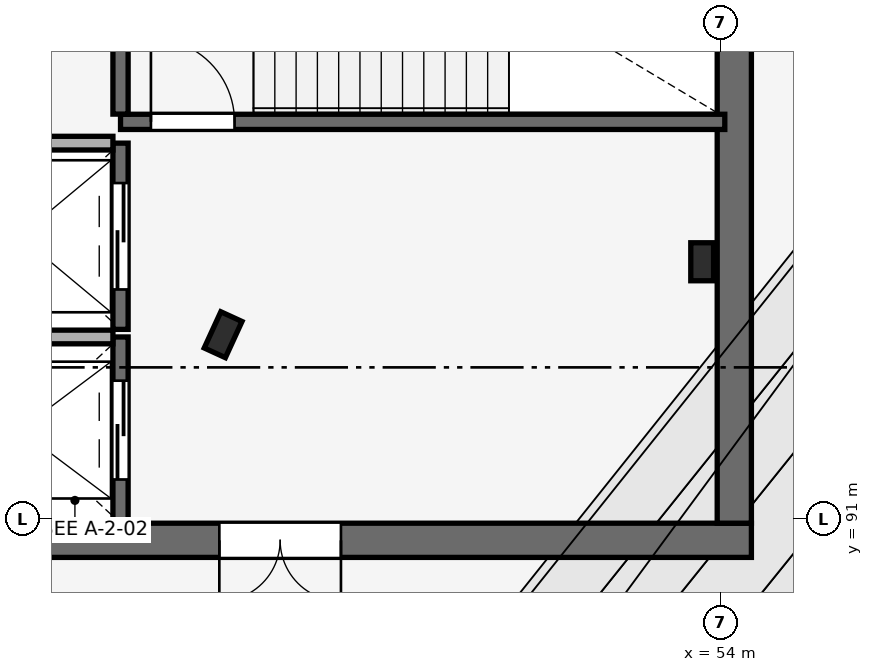
"""IFC4 building model, lengths in metres.
Left out: names, types, materials, properties, quantities, classifications, styles, units other than length and angle.
Written with IfcOpenShell. Run it as: python <this file> out.ifc"""

import sys

from ifc_helpers import new_model, si_unit, direction, frame, frame_2d, origin, origin_2d, place, context, subcontext, project, spatial, rectangle, i_section, extrude, element, fill, save


model = new_model("IFC4")
c1 = context("Model", 3, precision=1e-05, world=origin(), true_north=direction((0.0, 1.0)))
c2 = subcontext(c1, "Body", "Model", "MODEL_VIEW")
j1 = project(units=[si_unit("LENGTHUNIT", "METRE"), si_unit("PLANEANGLEUNIT", "RADIAN")], contexts=[c1])
p1 = place(None, origin())
s1 = spatial("IfcSite", under=j1, at=p1, CompositionType="ELEMENT")
p2 = place(p1, origin())
s2 = spatial("IfcBuilding", under=s1, at=p2, CompositionType="ELEMENT")
p3 = place(p2, frame((0.0, 0.0, 15.0)))
s3 = spatial("IfcBuildingStorey", under=s2, at=p3, CompositionType="ELEMENT", Elevation=15.0)
p4 = place(p3, frame((47.45, 93.43, 0.0), z_axis=(0.0, 0.0, 1.0), x_axis=(-0.909018020308, 0.416756810089, 0.0)))
e1 = element("IfcColumn", 1, at=p4, inside=s3, PredefinedType="COLUMN", context=c2, shape_type="SweptSolid", body=[
    extrude(i_section(OverallWidth=0.306, OverallDepth=0.524, WebThickness=0.021, FlangeThickness=0.04, FilletRadius=0.027, at=origin_2d()), origin(), (0.0, 0.0, 1.0), 4.5),
])
p5 = place(p3, frame((43.0, 90.725, 0.0), z_axis=(0.0, 0.0, 1.0), x_axis=(1.0, 0.0, 0.0)))
e2 = element("IfcWall", 2, at=p5, inside=s3, PredefinedType="SHEAR", context=c2, shape_type="SweptSolid", body=[
    extrude(rectangle(XDim=11.4, YDim=0.45, at=frame_2d((5.7, 0.0))), origin(), (0.0, 0.0, 1.0), 4.5),
])
p6 = place(p5, frame((4.4, 0.0, 0.0)))
e3 = element("IfcOpeningElement", 3, at=p6, cuts=e2, PredefinedType="OPENING", context=c2, shape_type="SweptSolid", body=[
    extrude(rectangle(XDim=1.6, YDim=2.2, at=frame_2d((0.8, 1.1))), frame((0.0, 0.235, 0.0), z_axis=(0.0, -1.0, 0.0), x_axis=(1.0, 0.0, 0.0)), (0.0, 0.0, 1.0), 0.47),
])
p7 = place(p3, frame((54.175, 90.95, 0.0), z_axis=(0.0, 0.0, 1.0), x_axis=(0.0, 1.0, 0.0)))
e4 = element("IfcWall", 4, at=p7, inside=s3, PredefinedType="SHEAR", context=c2, shape_type="SweptSolid", body=[
    extrude(rectangle(XDim=9.1, YDim=0.45, at=frame_2d((4.55, 0.0))), origin(), (0.0, 0.0, 1.0), 4.5),
])
p8 = place(p3, frame((53.752, 94.389, 0.0), z_axis=(0.0, 0.0, 1.0), x_axis=(1.0, 0.0, 0.0)))
e5 = element("IfcColumn", 5, at=p8, inside=s3, PredefinedType="COLUMN", context=c2, shape_type="SweptSolid", body=[
    extrude(i_section(OverallWidth=0.3, OverallDepth=0.5, WebThickness=0.014, FlangeThickness=0.028, FilletRadius=0.027, at=origin_2d()), origin(), (0.0, 0.0, 1.0), 4.5),
])
p9 = place(p3, frame((46.1, 90.95, 0.0), z_axis=(0.0, 0.0, 1.0), x_axis=(0.0, 1.0, 0.0)))
e6 = element("IfcWall", 6, at=p9, inside=s3, PredefinedType="SHEAR", context=c2, shape_type="SweptSolid", body=[
    extrude(rectangle(XDim=2.45, YDim=0.2, at=frame_2d((1.225, 0.0))), origin(), (0.0, 0.0, 1.0), 4.25),
])
p10 = place(p9, frame((0.575, 0.0, 0.0)))
e7 = element("IfcOpeningElement", 7, at=p10, cuts=e6, PredefinedType="OPENING", context=c2, shape_type="SweptSolid", body=[
    extrude(rectangle(XDim=1.3, YDim=2.2, at=frame_2d((0.65, 1.1))), frame((0.0, 0.11, 0.0), z_axis=(0.0, -1.0, 0.0), x_axis=(1.0, 0.0, 0.0)), (0.0, 0.0, 1.0), 0.22),
])
p11 = place(p3, frame((43.55, 93.4, 0.0), z_axis=(0.0, 0.0, 1.0), x_axis=(1.0, 0.0, 0.0)))
e8 = element("IfcWall", 8, at=p11, inside=s3, PredefinedType="PARTITIONING", context=c2, shape_type="SweptSolid", body=[
    extrude(rectangle(XDim=2.45, YDim=0.18, at=frame_2d((1.225, 0.0))), origin(), (0.0, 0.0, 1.0), 4.5),
])
p12 = place(p3, frame((46.1, 93.5, 0.0), z_axis=(0.0, 0.0, 1.0), x_axis=(0.0, 1.0, 0.0)))
e9 = element("IfcWall", 9, at=p12, inside=s3, PredefinedType="SHEAR", context=c2, shape_type="SweptSolid", body=[
    extrude(rectangle(XDim=2.45, YDim=0.2, at=frame_2d((1.225, 0.0))), origin(), (0.0, 0.0, 1.0), 4.25),
])
p13 = place(p12, frame((0.525, 0.0, 0.0)))
e10 = element("IfcOpeningElement", 10, at=p13, cuts=e9, PredefinedType="OPENING", context=c2, shape_type="SweptSolid", body=[
    extrude(rectangle(XDim=1.4, YDim=2.2, at=frame_2d((0.7, 1.1))), frame((0.0, 0.11, 0.0), z_axis=(0.0, -1.0, 0.0), x_axis=(1.0, 0.0, 0.0)), (0.0, 0.0, 1.0), 0.22),
])
p14 = place(p3, frame((43.55, 95.95, 0.0), z_axis=(0.0, 0.0, 1.0), x_axis=(1.0, 0.0, 0.0)))
e11 = element("IfcWall", 11, at=p14, inside=s3, PredefinedType="PARTITIONING", context=c2, shape_type="SweptSolid", body=[
    extrude(rectangle(XDim=2.45, YDim=0.18, at=frame_2d((1.225, 0.0))), origin(), (0.0, 0.0, 1.0), 4.5),
])
p15 = place(p3, frame((46.1, 96.23, 0.0), z_axis=(0.0, 0.0, 1.0), x_axis=(1.0, 0.0, 0.0)))
e12 = element("IfcWall", 12, at=p15, inside=s3, PredefinedType="SHEAR", context=c2, shape_type="SweptSolid", body=[
    extrude(rectangle(XDim=7.95, YDim=0.2, at=frame_2d((3.975, 0.0))), origin(), (0.0, 0.0, 1.0), 4.5),
])
p16 = place(p15, frame((0.4, 0.0, 0.0)))
e13 = element("IfcOpeningElement", 13, at=p16, cuts=e12, PredefinedType="OPENING", context=c2, shape_type="SweptSolid", body=[
    extrude(rectangle(XDim=1.1, YDim=2.15, at=frame_2d((0.55, 1.075))), frame((0.0, 0.11, 0.0), z_axis=(0.0, -1.0, 0.0), x_axis=(1.0, 0.0, 0.0)), (0.0, 0.0, 1.0), 0.22),
])
p17 = place(p3, frame((46.1, 96.332, 0.0), z_axis=(0.0, 0.0, 1.0), x_axis=(0.0, 1.0, 0.0)))
e14 = element("IfcWall", 14, at=p17, inside=s3, PredefinedType="SHEAR", context=c2, shape_type="SweptSolid", body=[
    extrude(rectangle(XDim=3.686, YDim=0.2, at=frame_2d((1.843, 0.0))), origin(), (0.0, 0.0, 1.0), 4.5),
])
p18 = place(p10, origin())
e15 = element("IfcDoor", 15, at=p18, inside=s3, OperationType="DOUBLE_DOOR_SLIDING", PredefinedType="DOOR", context=c2, shape_type="SweptSolid", body=[
    extrude(rectangle(XDim=1.3, YDim=2.2, at=frame_2d((0.65, 1.1))), frame((0.0, 0.025, 0.0), z_axis=(0.0, -1.0, 0.0), x_axis=(1.0, 0.0, 0.0)), (0.0, 0.0, 1.0), 0.05),
])
fill(e7, e15)
p19 = place(p13, origin())
e16 = element("IfcDoor", 16, at=p19, inside=s3, OperationType="DOUBLE_DOOR_SLIDING", PredefinedType="DOOR", context=c2, shape_type="SweptSolid", body=[
    extrude(rectangle(XDim=1.4, YDim=2.2, at=frame_2d((0.7, 1.1))), frame((0.0, 0.025, 0.0), z_axis=(0.0, -1.0, 0.0), x_axis=(1.0, 0.0, 0.0)), (0.0, 0.0, 1.0), 0.05),
])
fill(e10, e16)
p20 = place(p16, frame((1.1, 0.0, 0.0), z_axis=(0.0, 0.0, 1.0), x_axis=(-1.0, 0.0, 0.0)))
e17 = element("IfcDoor", 17, at=p20, inside=s3, OperationType="SINGLE_SWING_RIGHT", PredefinedType="DOOR", context=c2, shape_type="SweptSolid", body=[
    extrude(rectangle(XDim=1.1, YDim=2.15, at=frame_2d((0.55, 1.075))), frame((0.0, 0.025, 0.0), z_axis=(0.0, -1.0, 0.0), x_axis=(1.0, 0.0, 0.0)), (0.0, 0.0, 1.0), 0.05),
])
fill(e13, e17)
p21 = place(p6, frame((1.6, 0.0, 0.0), z_axis=(0.0, 0.0, 1.0), x_axis=(-1.0, 0.0, 0.0)))
e18 = element("IfcDoor", 18, at=p21, inside=s3, OperationType="DOUBLE_DOOR_SINGLE_SWING", PredefinedType="DOOR", context=c2, shape_type="SweptSolid", body=[
    extrude(rectangle(XDim=1.6, YDim=2.2, at=frame_2d((0.8, 1.1))), frame((0.0, 0.025, 0.0), z_axis=(0.0, -1.0, 0.0), x_axis=(1.0, 0.0, 0.0)), (0.0, 0.0, 1.0), 0.05),
])
fill(e3, e18)
save(model, sys.argv[1])
